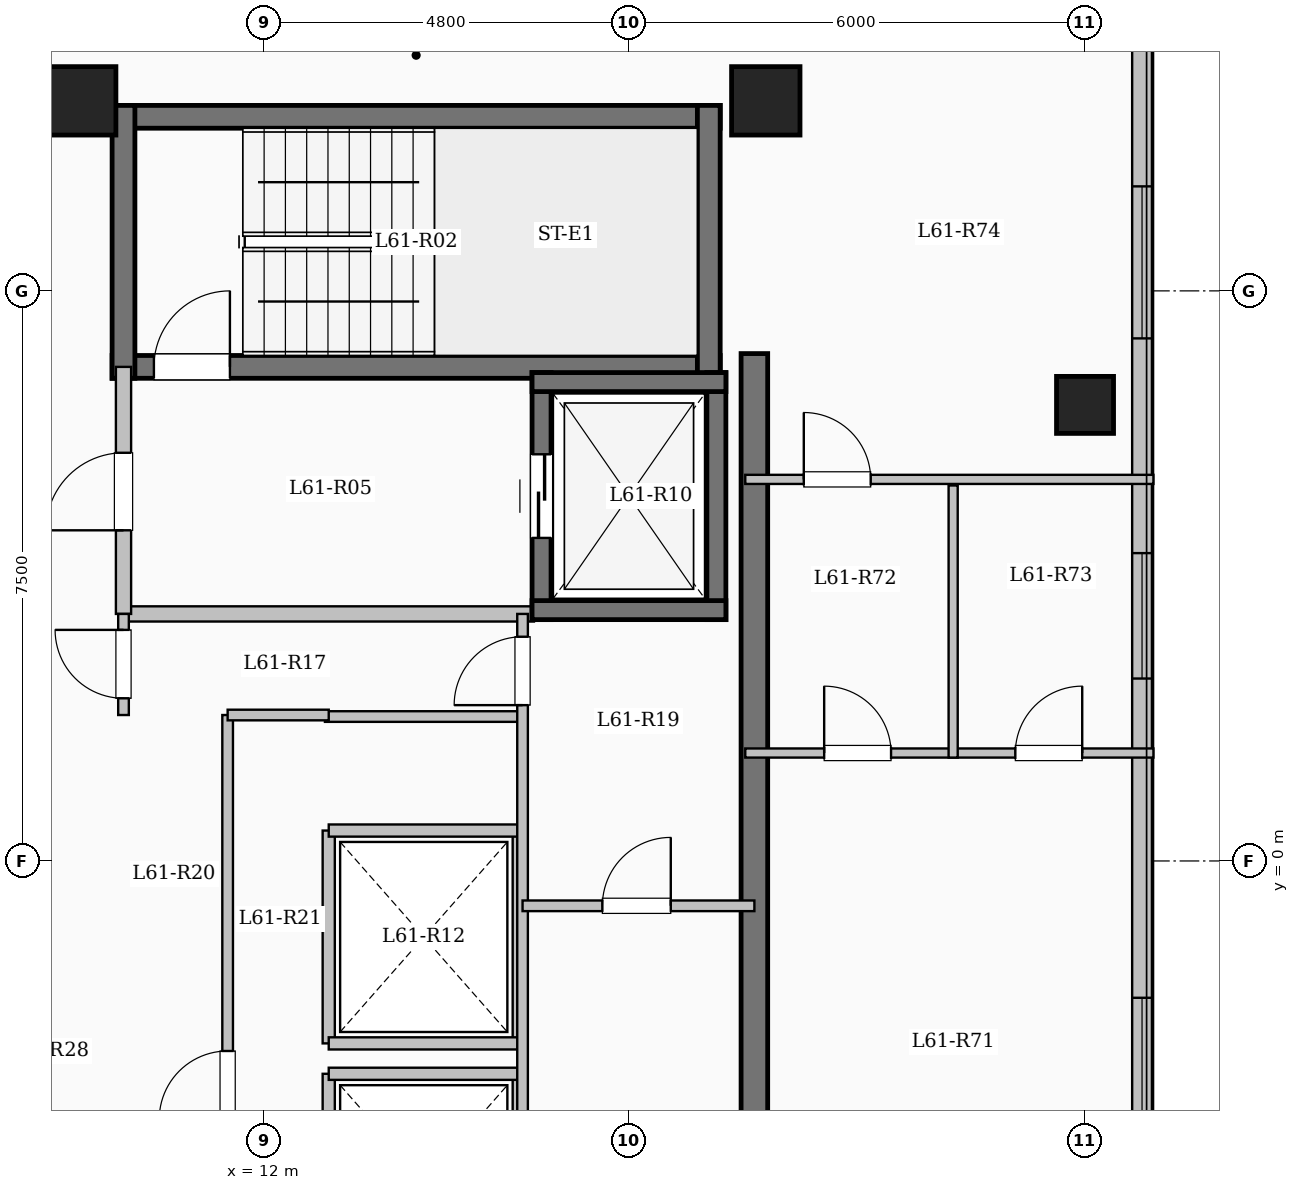
"""IFC4 building model, lengths in metres.
Left out: names, types, materials, properties, quantities, classifications, styles, units other than length and angle.
Written with IfcOpenShell. Run it as: python <this file> out.ifc"""

import sys

from ifc_helpers import new_model, si_unit, direction, frame, frame_2d, origin, origin_2d, place, context, subcontext, project, spatial, rectangle, extrude, element, fill, save


model = new_model("IFC4")
c1 = context("Model", 3, precision=1e-05, world=origin(), true_north=direction((0.0, 1.0)))
c2 = subcontext(c1, "Body", "Model", "MODEL_VIEW")
j1 = project(units=[si_unit("LENGTHUNIT", "METRE"), si_unit("PLANEANGLEUNIT", "RADIAN")], contexts=[c1])
p1 = place(None, origin())
s1 = spatial("IfcSite", under=j1, at=p1, CompositionType="ELEMENT")
p2 = place(p1, origin())
s2 = spatial("IfcBuilding", under=s1, at=p2, CompositionType="ELEMENT")
p3 = place(p2, frame((0.0, 0.0, 223.75)))
s3 = spatial("IfcBuildingStorey", under=s2, at=p3, CompositionType="ELEMENT", Elevation=223.75)
for number, where, z_axis, x_axis in (
    (1, (9.6, 10.0, 0.0), (0.0, 0.0, 1.0), (1.0, 0.0, 0.0)),
    (2, (18.6, 10.0, 0.0), (0.0, 0.0, 1.0), (1.0, 0.0, 0.0)),
):
    element("IfcColumn", number, at=place(p3, frame(where, z_axis=z_axis, x_axis=x_axis)), inside=s3, PredefinedType="COLUMN", context=c2, shape_type="SweptSolid", body=[
        extrude(rectangle(XDim=0.9, YDim=0.9, at=origin_2d()), origin(), (0.0, 0.0, 1.0), 3.35),
    ])
p4 = place(p3, frame((22.8, 6.0, 0.0), z_axis=(0.0, 0.0, 1.0), x_axis=(1.0, 0.0, 0.0)))
e3 = element("IfcColumn", 3, at=p4, inside=s3, PredefinedType="COLUMN", context=c2, shape_type="SweptSolid", body=[
    extrude(rectangle(XDim=0.75, YDim=0.75, at=origin_2d()), origin(), (0.0, 0.0, 1.0), 3.35),
])
p5 = place(p3, frame((23.55, 17.25, 0.0), z_axis=(0.0, 0.0, 1.0), x_axis=(0.0, -1.0, 0.0)))
e4 = element("IfcWall", 4, at=p5, inside=s3, PredefinedType="SOLIDWALL", context=c2, shape_type="SweptSolid", body=[
    extrude(rectangle(XDim=34.5, YDim=0.26, at=frame_2d((17.25, 0.0))), origin(), (0.0, 0.0, 1.0), 3.05),
])
p6 = place(p5, frame((1.375, 0.0, 0.9)))
e5 = element("IfcOpeningElement", 5, at=p6, cuts=e4, PredefinedType="OPENING", context=c2, shape_type="SweptSolid", body=[
    extrude(rectangle(XDim=2.0, YDim=1.7, at=frame_2d((1.0, 0.85))), frame((0.0, 0.14, 0.0), z_axis=(0.0, -1.0, 0.0), x_axis=(1.0, 0.0, 0.0)), (0.0, 0.0, 1.0), 0.28),
])
p7 = place(p5, frame((5.125, 0.0, 0.95)))
e6 = element("IfcOpeningElement", 6, at=p7, cuts=e4, PredefinedType="OPENING", context=c2, shape_type="SweptSolid", body=[
    extrude(rectangle(XDim=1.0, YDim=1.5, at=frame_2d((0.5, 0.75))), frame((0.0, 0.14, 0.0), z_axis=(0.0, -1.0, 0.0), x_axis=(1.0, 0.0, 0.0)), (0.0, 0.0, 1.0), 0.28),
])
p8 = place(p5, frame((8.375, 0.0, 0.9)))
e7 = element("IfcOpeningElement", 7, at=p8, cuts=e4, PredefinedType="OPENING", context=c2, shape_type="SweptSolid", body=[
    extrude(rectangle(XDim=2.0, YDim=1.7, at=frame_2d((1.0, 0.85))), frame((0.0, 0.14, 0.0), z_axis=(0.0, -1.0, 0.0), x_axis=(1.0, 0.0, 0.0)), (0.0, 0.0, 1.0), 0.28),
])
p9 = place(p5, frame((13.2, 0.0, 0.9)))
e8 = element("IfcOpeningElement", 8, at=p9, cuts=e4, PredefinedType="OPENING", context=c2, shape_type="SweptSolid", body=[
    extrude(rectangle(XDim=1.65, YDim=1.6, at=frame_2d((0.825, 0.8))), frame((0.0, 0.14, 0.0), z_axis=(0.0, -1.0, 0.0), x_axis=(1.0, 0.0, 0.0)), (0.0, 0.0, 1.0), 0.28),
])
p10 = place(p5, frame((19.05, 0.0, 0.9)))
e9 = element("IfcOpeningElement", 9, at=p10, cuts=e4, PredefinedType="OPENING", context=c2, shape_type="SweptSolid", body=[
    extrude(rectangle(XDim=2.2, YDim=1.75, at=frame_2d((1.1, 0.875))), frame((0.0, 0.14, 0.0), z_axis=(0.0, -1.0, 0.0), x_axis=(1.0, 0.0, 0.0)), (0.0, 0.0, 1.0), 0.28),
])
p11 = place(p5, frame((24.975, 0.0, 0.95)))
e10 = element("IfcOpeningElement", 10, at=p11, cuts=e4, PredefinedType="OPENING", context=c2, shape_type="SweptSolid", body=[
    extrude(rectangle(XDim=1.2, YDim=1.5, at=frame_2d((0.6, 0.75))), frame((0.0, 0.14, 0.0), z_axis=(0.0, -1.0, 0.0), x_axis=(1.0, 0.0, 0.0)), (0.0, 0.0, 1.0), 0.28),
])
p12 = place(p5, frame((29.475, 0.0, 0.9)))
e11 = element("IfcOpeningElement", 11, at=p12, cuts=e4, PredefinedType="OPENING", context=c2, shape_type="SweptSolid", body=[
    extrude(rectangle(XDim=2.2, YDim=1.75, at=frame_2d((1.1, 0.875))), frame((0.0, 0.14, 0.0), z_axis=(0.0, -1.0, 0.0), x_axis=(1.0, 0.0, 0.0)), (0.0, 0.0, 1.0), 0.28),
])
p13 = place(p3, frame((10.0, 9.79, 0.0), z_axis=(0.0, 0.0, 1.0), x_axis=(1.0, 0.0, 0.0)))
e12 = element("IfcWall", 12, at=p13, inside=s3, PredefinedType="SHEAR", context=c2, shape_type="SweptSolid", body=[
    extrude(rectangle(XDim=8.0, YDim=0.3, at=frame_2d((4.0, 0.0))), origin(), (0.0, 0.0, 1.0), 3.35),
])
p14 = place(p3, frame((10.0, 6.5, 0.0), z_axis=(0.0, 0.0, 1.0), x_axis=(1.0, 0.0, 0.0)))
e13 = element("IfcWall", 13, at=p14, inside=s3, PredefinedType="SHEAR", context=c2, shape_type="SweptSolid", body=[
    extrude(rectangle(XDim=8.0, YDim=0.3, at=frame_2d((4.0, 0.0))), origin(), (0.0, 0.0, 1.0), 3.35),
])
p15 = place(p14, frame((0.55, 0.0, 0.0)))
e14 = element("IfcOpeningElement", 14, at=p15, cuts=e13, PredefinedType="OPENING", context=c2, shape_type="SweptSolid", body=[
    extrude(rectangle(XDim=1.0, YDim=2.15, at=frame_2d((0.5, 1.075))), frame((0.0, 0.16, 0.0), z_axis=(0.0, -1.0, 0.0), x_axis=(1.0, 0.0, 0.0)), (0.0, 0.0, 1.0), 0.32),
])
for number, where, z_axis, x_axis in (
    (15, (10.15, 6.35, 0.0), (0.0, 0.0, 1.0), (0.0, 1.0, 0.0)),
    (16, (17.85, 6.35, 0.0), (0.0, 0.0, 1.0), (0.0, 1.0, 0.0)),
):
    element("IfcWall", number, at=place(p3, frame(where, z_axis=z_axis, x_axis=x_axis)), inside=s3, PredefinedType="SHEAR", context=c2, shape_type="SweptSolid", body=[
        extrude(rectangle(XDim=3.59, YDim=0.3, at=frame_2d((1.795, 0.0))), origin(), (0.0, 0.0, 1.0), 3.35),
    ])
p16 = place(p3, frame((10.15, 3.25, 0.0), z_axis=(0.0, 0.0, 1.0), x_axis=(1.0, 0.0, 0.0)))
e17 = element("IfcWall", 17, at=p16, inside=s3, PredefinedType="SOLIDWALL", context=c2, shape_type="SweptSolid", body=[
    extrude(rectangle(XDim=5.4, YDim=0.2, at=frame_2d((2.7, 0.0))), origin(), (0.0, 0.0, 1.0), 3.05),
])
p17 = place(p3, frame((10.15, 3.25, 0.0), z_axis=(0.0, 0.0, 1.0), x_axis=(0.0, 1.0, 0.0)))
e18 = element("IfcWall", 18, at=p17, inside=s3, PredefinedType="SOLIDWALL", context=c2, shape_type="SweptSolid", body=[
    extrude(rectangle(XDim=3.25, YDim=0.2, at=frame_2d((1.625, 0.0))), origin(), (0.0, 0.0, 1.0), 3.05),
])
p18 = place(p17, frame((1.1, 0.0, 0.0)))
e19 = element("IfcOpeningElement", 19, at=p18, cuts=e18, PredefinedType="OPENING", context=c2, shape_type="SweptSolid", body=[
    extrude(rectangle(XDim=1.02, YDim=2.15, at=frame_2d((0.51, 1.075))), frame((0.0, 0.11, 0.0), z_axis=(0.0, -1.0, 0.0), x_axis=(1.0, 0.0, 0.0)), (0.0, 0.0, 1.0), 0.22),
])
p19 = place(p3, frame((15.65, 3.175, 0.0), z_axis=(0.0, 0.0, 1.0), x_axis=(0.0, 1.0, 0.0)))
e20 = element("IfcWall", 20, at=p19, inside=s3, PredefinedType="SHEAR", context=c2, shape_type="SweptSolid", body=[
    extrude(rectangle(XDim=3.25, YDim=0.25, at=frame_2d((1.625, 0.0))), origin(), (0.0, 0.0, 1.0), 3.35),
])
p20 = place(p19, frame((1.075, 0.0, 0.0)))
e21 = element("IfcOpeningElement", 21, at=p20, cuts=e20, PredefinedType="OPENING", context=c2, shape_type="SweptSolid", body=[
    extrude(rectangle(XDim=1.1, YDim=2.15, at=frame_2d((0.55, 1.075))), frame((0.0, 0.135, 0.0), z_axis=(0.0, -1.0, 0.0), x_axis=(1.0, 0.0, 0.0)), (0.0, 0.0, 1.0), 0.27),
])
p21 = place(p3, frame((17.95, 3.175, 0.0), z_axis=(0.0, 0.0, 1.0), x_axis=(0.0, 1.0, 0.0)))
e22 = element("IfcWall", 22, at=p21, inside=s3, PredefinedType="SHEAR", context=c2, shape_type="SweptSolid", body=[
    extrude(rectangle(XDim=3.25, YDim=0.25, at=frame_2d((1.625, 0.0))), origin(), (0.0, 0.0, 1.0), 3.35),
])
for number, where, z_axis, x_axis in (
    (23, (15.525, 3.3, 0.0), (0.0, 0.0, 1.0), (1.0, 0.0, 0.0)),
    (24, (15.525, 6.3, 0.0), (0.0, 0.0, 1.0), (1.0, 0.0, 0.0)),
):
    element("IfcWall", number, at=place(p3, frame(where, z_axis=z_axis, x_axis=x_axis)), inside=s3, PredefinedType="SHEAR", context=c2, shape_type="SweptSolid", body=[
        extrude(rectangle(XDim=2.55, YDim=0.25, at=frame_2d((1.275, 0.0))), origin(), (0.0, 0.0, 1.0), 3.35),
    ])
for number, where, z_axis, x_axis in (
    (25, (12.85, -5.6, 0.0), (0.0, 0.0, 1.0), (0.0, 1.0, 0.0)),
    (26, (15.35, -5.6, 0.0), (0.0, 0.0, 1.0), (0.0, 1.0, 0.0)),
):
    element("IfcWall", number, at=place(p3, frame(where, z_axis=z_axis, x_axis=x_axis)), inside=s3, PredefinedType="SOLIDWALL", context=c2, shape_type="SweptSolid", body=[
        extrude(rectangle(XDim=2.8, YDim=0.16, at=frame_2d((1.4, 0.0))), origin(), (0.0, 0.0, 1.0), 3.05),
    ])
p22 = place(p3, frame((12.85, -2.8, 0.0), z_axis=(0.0, 0.0, 1.0), x_axis=(1.0, 0.0, 0.0)))
e27 = element("IfcWall", 27, at=p22, inside=s3, PredefinedType="SOLIDWALL", context=c2, shape_type="SweptSolid", body=[
    extrude(rectangle(XDim=2.5, YDim=0.16, at=frame_2d((1.25, 0.0))), origin(), (0.0, 0.0, 1.0), 3.05),
])
for number, where, z_axis, x_axis in (
    (28, (12.85, -2.4, 0.0), (0.0, 0.0, 1.0), (0.0, 1.0, 0.0)),
    (29, (15.35, -2.4, 0.0), (0.0, 0.0, 1.0), (0.0, 1.0, 0.0)),
):
    element("IfcWall", number, at=place(p3, frame(where, z_axis=z_axis, x_axis=x_axis)), inside=s3, PredefinedType="SOLIDWALL", context=c2, shape_type="SweptSolid", body=[
        extrude(rectangle(XDim=2.8, YDim=0.16, at=frame_2d((1.4, 0.0))), origin(), (0.0, 0.0, 1.0), 3.05),
    ])
for number, where, z_axis, x_axis in (
    (30, (12.85, -2.4, 0.0), (0.0, 0.0, 1.0), (1.0, 0.0, 0.0)),
    (31, (12.85, 0.4, 0.0), (0.0, 0.0, 1.0), (1.0, 0.0, 0.0)),
):
    element("IfcWall", number, at=place(p3, frame(where, z_axis=z_axis, x_axis=x_axis)), inside=s3, PredefinedType="SOLIDWALL", context=c2, shape_type="SweptSolid", body=[
        extrude(rectangle(XDim=2.5, YDim=0.16, at=frame_2d((1.25, 0.0))), origin(), (0.0, 0.0, 1.0), 3.05),
    ])
p23 = place(p3, frame((18.45, -7.375, 0.0), z_axis=(0.0, 0.0, 1.0), x_axis=(0.0, 1.0, 0.0)))
e32 = element("IfcWall", 32, at=p23, inside=s3, PredefinedType="SHEAR", context=c2, shape_type="SweptSolid", body=[
    extrude(rectangle(XDim=14.05, YDim=0.35, at=frame_2d((7.025, 0.0))), origin(), (0.0, 0.0, 1.0), 3.35),
])
p24 = place(p3, frame((12.8, 1.9, 0.0), z_axis=(0.0, 0.0, 1.0), x_axis=(1.0, 0.0, 0.0)))
e33 = element("IfcWall", 33, at=p24, inside=s3, PredefinedType="PARTITIONING", context=c2, shape_type="SweptSolid", body=[
    extrude(rectangle(XDim=2.6, YDim=0.14, at=frame_2d((1.3, 0.0))), origin(), (0.0, 0.0, 1.0), 3.05),
])
p25 = place(p3, frame((10.15, 1.92, 0.0), z_axis=(0.0, 0.0, 1.0), x_axis=(0.0, 1.0, 0.0)))
e34 = element("IfcWall", 34, at=p25, inside=s3, PredefinedType="PARTITIONING", context=c2, shape_type="SweptSolid", body=[
    extrude(rectangle(XDim=1.33, YDim=0.14, at=frame_2d((0.665, 0.0))), origin(), (0.0, 0.0, 1.0), 3.05),
])
p26 = place(p25, frame((0.22, 0.0, 0.0)))
e35 = element("IfcOpeningElement", 35, at=p26, cuts=e34, PredefinedType="OPENING", context=c2, shape_type="SweptSolid", body=[
    extrude(rectangle(XDim=0.9, YDim=2.08, at=frame_2d((0.45, 1.04))), frame((0.0, 0.08, 0.0), z_axis=(0.0, -1.0, 0.0), x_axis=(1.0, 0.0, 0.0)), (0.0, 0.0, 1.0), 0.16),
])
p27 = place(p3, frame((15.4, -7.2, 0.0), z_axis=(0.0, 0.0, 1.0), x_axis=(0.0, 1.0, 0.0)))
e36 = element("IfcWall", 36, at=p27, inside=s3, PredefinedType="PARTITIONING", context=c2, shape_type="SweptSolid", body=[
    extrude(rectangle(XDim=10.45, YDim=0.14, at=frame_2d((5.225, 0.0))), origin(), (0.0, 0.0, 1.0), 3.05),
])
p28 = place(p27, frame((9.25, 0.0, 0.0)))
e37 = element("IfcOpeningElement", 37, at=p28, cuts=e36, PredefinedType="OPENING", context=c2, shape_type="SweptSolid", body=[
    extrude(rectangle(XDim=0.9, YDim=2.08, at=frame_2d((0.45, 1.04))), frame((0.0, 0.08, 0.0), z_axis=(0.0, -1.0, 0.0), x_axis=(1.0, 0.0, 0.0)), (0.0, 0.0, 1.0), 0.16),
])
p29 = place(p3, frame((15.4, -0.59, 0.0), z_axis=(0.0, 0.0, 1.0), x_axis=(1.0, 0.0, 0.0)))
e38 = element("IfcWall", 38, at=p29, inside=s3, PredefinedType="PARTITIONING", context=c2, shape_type="SweptSolid", body=[
    extrude(rectangle(XDim=3.05, YDim=0.14, at=frame_2d((1.525, 0.0))), origin(), (0.0, 0.0, 1.0), 3.05),
])
p30 = place(p29, frame((1.05, 0.0, 0.0)))
e39 = element("IfcOpeningElement", 39, at=p30, cuts=e38, PredefinedType="OPENING", context=c2, shape_type="SweptSolid", body=[
    extrude(rectangle(XDim=0.9, YDim=2.08, at=frame_2d((0.45, 1.04))), frame((0.0, 0.08, 0.0), z_axis=(0.0, -1.0, 0.0), x_axis=(1.0, 0.0, 0.0)), (0.0, 0.0, 1.0), 0.16),
])
p31 = place(p3, frame((11.52, -7.2, 0.0), z_axis=(0.0, 0.0, 1.0), x_axis=(0.0, 1.0, 0.0)))
e40 = element("IfcWall", 40, at=p31, inside=s3, PredefinedType="PARTITIONING", context=c2, shape_type="SweptSolid", body=[
    extrude(rectangle(XDim=9.12, YDim=0.14, at=frame_2d((4.56, 0.0))), origin(), (0.0, 0.0, 1.0), 3.05),
])
p32 = place(p31, frame((3.8, 0.0, 0.0)))
e41 = element("IfcOpeningElement", 41, at=p32, cuts=e40, PredefinedType="OPENING", context=c2, shape_type="SweptSolid", body=[
    extrude(rectangle(XDim=0.9, YDim=2.08, at=frame_2d((0.45, 1.04))), frame((0.0, 0.08, 0.0), z_axis=(0.0, -1.0, 0.0), x_axis=(1.0, 0.0, 0.0)), (0.0, 0.0, 1.0), 0.16),
])
p33 = place(p3, frame((11.52, 1.92, 0.0), z_axis=(0.0, 0.0, 1.0), x_axis=(1.0, 0.0, 0.0)))
e42 = element("IfcWall", 42, at=p33, inside=s3, PredefinedType="PARTITIONING", context=c2, shape_type="SweptSolid", body=[
    extrude(rectangle(XDim=1.33, YDim=0.14, at=frame_2d((0.665, 0.0))), origin(), (0.0, 0.0, 1.0), 3.05),
])
p34 = place(p3, frame((18.33, 1.42, 0.0), z_axis=(0.0, 0.0, 1.0), x_axis=(1.0, 0.0, 0.0)))
e43 = element("IfcWall", 43, at=p34, inside=s3, PredefinedType="PARTITIONING", context=c2, shape_type="SweptSolid", body=[
    extrude(rectangle(XDim=5.37, YDim=0.12, at=frame_2d((2.685, 0.0))), origin(), (0.0, 0.0, 1.0), 3.05),
])
p35 = place(p34, frame((1.038, 0.0, 0.0)))
e44 = element("IfcOpeningElement", 44, at=p35, cuts=e43, PredefinedType="OPENING", context=c2, shape_type="SweptSolid", body=[
    extrude(rectangle(XDim=0.88, YDim=2.1, at=frame_2d((0.44, 1.05))), frame((0.0, 0.07, 0.0), z_axis=(0.0, -1.0, 0.0), x_axis=(1.0, 0.0, 0.0)), (0.0, 0.0, 1.0), 0.14),
])
p36 = place(p34, frame((3.553, 0.0, 0.0)))
e45 = element("IfcOpeningElement", 45, at=p36, cuts=e43, PredefinedType="OPENING", context=c2, shape_type="SweptSolid", body=[
    extrude(rectangle(XDim=0.88, YDim=2.1, at=frame_2d((0.44, 1.05))), frame((0.0, 0.07, 0.0), z_axis=(0.0, -1.0, 0.0), x_axis=(1.0, 0.0, 0.0)), (0.0, 0.0, 1.0), 0.14),
])
p37 = place(p3, frame((18.33, 5.02, 0.0), z_axis=(0.0, 0.0, 1.0), x_axis=(1.0, 0.0, 0.0)))
e46 = element("IfcWall", 46, at=p37, inside=s3, PredefinedType="PARTITIONING", context=c2, shape_type="SweptSolid", body=[
    extrude(rectangle(XDim=5.37, YDim=0.12, at=frame_2d((2.685, 0.0))), origin(), (0.0, 0.0, 1.0), 3.05),
])
p38 = place(p37, frame((0.77, 0.0, 0.0)))
e47 = element("IfcOpeningElement", 47, at=p38, cuts=e46, PredefinedType="OPENING", context=c2, shape_type="SweptSolid", body=[
    extrude(rectangle(XDim=0.88, YDim=2.1, at=frame_2d((0.44, 1.05))), frame((0.0, 0.07, 0.0), z_axis=(0.0, -1.0, 0.0), x_axis=(1.0, 0.0, 0.0)), (0.0, 0.0, 1.0), 0.14),
])
p39 = place(p3, frame((21.065, 1.36, 0.0), z_axis=(0.0, 0.0, 1.0), x_axis=(0.0, 1.0, 0.0)))
e48 = element("IfcWall", 48, at=p39, inside=s3, PredefinedType="PARTITIONING", context=c2, shape_type="SweptSolid", body=[
    extrude(rectangle(XDim=3.58, YDim=0.12, at=frame_2d((1.79, 0.0))), origin(), (0.0, 0.0, 1.0), 3.05),
])
p40 = place(p8, origin())
e49 = element("IfcWindow", 49, at=p40, inside=s3, PartitioningType="SINGLE_PANEL", PredefinedType="WINDOW", context=c2, shape_type="SweptSolid", body=[
    extrude(rectangle(XDim=2.0, YDim=1.7, at=frame_2d((1.0, 0.85))), frame((0.0, 0.03, 0.0), z_axis=(0.0, -1.0, 0.0), x_axis=(1.0, 0.0, 0.0)), (0.0, 0.0, 1.0), 0.06),
])
fill(e7, e49)
p41 = place(p9, origin())
e50 = element("IfcWindow", 50, at=p41, inside=s3, PartitioningType="SINGLE_PANEL", PredefinedType="WINDOW", context=c2, shape_type="SweptSolid", body=[
    extrude(rectangle(XDim=1.65, YDim=1.6, at=frame_2d((0.825, 0.8))), frame((0.0, 0.03, 0.0), z_axis=(0.0, -1.0, 0.0), x_axis=(1.0, 0.0, 0.0)), (0.0, 0.0, 1.0), 0.06),
])
fill(e8, e50)
p42 = place(p10, origin())
e51 = element("IfcWindow", 51, at=p42, inside=s3, PartitioningType="SINGLE_PANEL", PredefinedType="WINDOW", context=c2, shape_type="SweptSolid", body=[
    extrude(rectangle(XDim=2.2, YDim=1.75, at=frame_2d((1.1, 0.875))), frame((0.0, 0.03, 0.0), z_axis=(0.0, -1.0, 0.0), x_axis=(1.0, 0.0, 0.0)), (0.0, 0.0, 1.0), 0.06),
])
fill(e9, e51)
p43 = place(p15, origin())
e52 = element("IfcDoor", 52, at=p43, inside=s3, OperationType="SINGLE_SWING_RIGHT", PredefinedType="DOOR", context=c2, shape_type="SweptSolid", body=[
    extrude(rectangle(XDim=1.0, YDim=2.15, at=frame_2d((0.5, 1.075))), frame((0.0, 0.025, 0.0), z_axis=(0.0, -1.0, 0.0), x_axis=(1.0, 0.0, 0.0)), (0.0, 0.0, 1.0), 0.05),
])
fill(e14, e52)
p44 = place(p18, origin())
e53 = element("IfcDoor", 53, at=p44, inside=s3, OperationType="SINGLE_SWING_LEFT", PredefinedType="DOOR", context=c2, shape_type="SweptSolid", body=[
    extrude(rectangle(XDim=1.02, YDim=2.15, at=frame_2d((0.51, 1.075))), frame((0.0, 0.025, 0.0), z_axis=(0.0, -1.0, 0.0), x_axis=(1.0, 0.0, 0.0)), (0.0, 0.0, 1.0), 0.05),
])
fill(e19, e53)
p45 = place(p20, origin())
e54 = element("IfcDoor", 54, at=p45, inside=s3, OperationType="SLIDING_TO_LEFT", PredefinedType="DOOR", context=c2, shape_type="SweptSolid", body=[
    extrude(rectangle(XDim=1.1, YDim=2.15, at=frame_2d((0.55, 1.075))), frame((0.0, 0.025, 0.0), z_axis=(0.0, -1.0, 0.0), x_axis=(1.0, 0.0, 0.0)), (0.0, 0.0, 1.0), 0.05),
])
fill(e21, e54)
p46 = place(p26, origin())
e55 = element("IfcDoor", 55, at=p46, inside=s3, OperationType="SINGLE_SWING_RIGHT", PredefinedType="DOOR", context=c2, shape_type="SweptSolid", body=[
    extrude(rectangle(XDim=0.9, YDim=2.08, at=frame_2d((0.45, 1.04))), frame((0.0, 0.025, 0.0), z_axis=(0.0, -1.0, 0.0), x_axis=(1.0, 0.0, 0.0)), (0.0, 0.0, 1.0), 0.05),
])
fill(e35, e55)
p47 = place(p28, origin())
e56 = element("IfcDoor", 56, at=p47, inside=s3, OperationType="SINGLE_SWING_LEFT", PredefinedType="DOOR", context=c2, shape_type="SweptSolid", body=[
    extrude(rectangle(XDim=0.9, YDim=2.08, at=frame_2d((0.45, 1.04))), frame((0.0, 0.025, 0.0), z_axis=(0.0, -1.0, 0.0), x_axis=(1.0, 0.0, 0.0)), (0.0, 0.0, 1.0), 0.05),
])
fill(e37, e56)
p48 = place(p30, origin())
e57 = element("IfcDoor", 57, at=p48, inside=s3, OperationType="SINGLE_SWING_RIGHT", PredefinedType="DOOR", context=c2, shape_type="SweptSolid", body=[
    extrude(rectangle(XDim=0.9, YDim=2.08, at=frame_2d((0.45, 1.04))), frame((0.0, 0.025, 0.0), z_axis=(0.0, -1.0, 0.0), x_axis=(1.0, 0.0, 0.0)), (0.0, 0.0, 1.0), 0.05),
])
fill(e39, e57)
p49 = place(p32, origin())
e58 = element("IfcDoor", 58, at=p49, inside=s3, OperationType="SINGLE_SWING_LEFT", PredefinedType="DOOR", context=c2, shape_type="SweptSolid", body=[
    extrude(rectangle(XDim=0.9, YDim=2.08, at=frame_2d((0.45, 1.04))), frame((0.0, 0.025, 0.0), z_axis=(0.0, -1.0, 0.0), x_axis=(1.0, 0.0, 0.0)), (0.0, 0.0, 1.0), 0.05),
])
fill(e41, e58)
p50 = place(p35, origin())
e59 = element("IfcDoor", 59, at=p50, inside=s3, OperationType="SINGLE_SWING_LEFT", PredefinedType="DOOR", context=c2, shape_type="SweptSolid", body=[
    extrude(rectangle(XDim=0.88, YDim=2.1, at=frame_2d((0.44, 1.05))), frame((0.0, 0.025, 0.0), z_axis=(0.0, -1.0, 0.0), x_axis=(1.0, 0.0, 0.0)), (0.0, 0.0, 1.0), 0.05),
])
fill(e44, e59)
p51 = place(p36, origin())
e60 = element("IfcDoor", 60, at=p51, inside=s3, OperationType="SINGLE_SWING_RIGHT", PredefinedType="DOOR", context=c2, shape_type="SweptSolid", body=[
    extrude(rectangle(XDim=0.88, YDim=2.1, at=frame_2d((0.44, 1.05))), frame((0.0, 0.025, 0.0), z_axis=(0.0, -1.0, 0.0), x_axis=(1.0, 0.0, 0.0)), (0.0, 0.0, 1.0), 0.05),
])
fill(e45, e60)
p52 = place(p38, origin())
e61 = element("IfcDoor", 61, at=p52, inside=s3, OperationType="SINGLE_SWING_LEFT", PredefinedType="DOOR", context=c2, shape_type="SweptSolid", body=[
    extrude(rectangle(XDim=0.88, YDim=2.1, at=frame_2d((0.44, 1.05))), frame((0.0, 0.025, 0.0), z_axis=(0.0, -1.0, 0.0), x_axis=(1.0, 0.0, 0.0)), (0.0, 0.0, 1.0), 0.05),
])
fill(e47, e61)
save(model, sys.argv[1])
